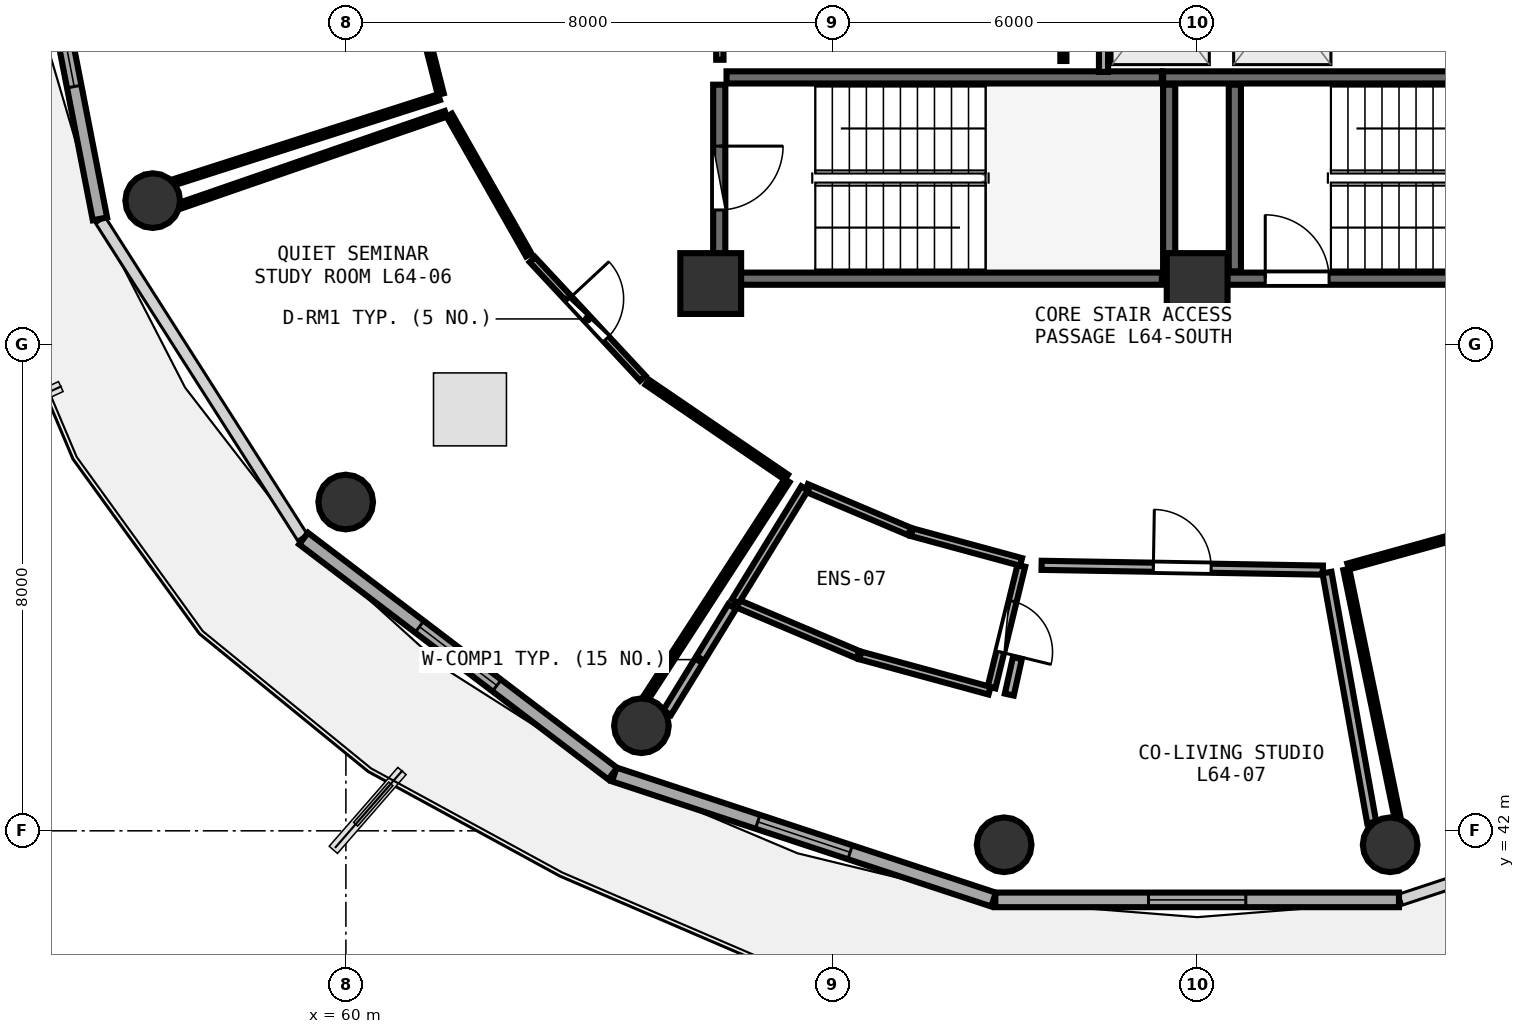
"""IFC4 building model, lengths in metres.
Left out: names, types, materials, properties, quantities, classifications, styles, units other than length and angle.
Written with IfcOpenShell. Run it as: python <this file> out.ifc"""

import sys

from ifc_helpers import new_model, si_unit, direction, frame, frame_2d, origin, origin_2d, place, context, subcontext, project, spatial, rectangle, circle, extrude, element, fill, save


model = new_model("IFC4")
c1 = context("Model", 3, precision=1e-05, world=origin(), true_north=direction((0.0, 1.0)))
c2 = subcontext(c1, "Body", "Model", "MODEL_VIEW")
j1 = project(units=[si_unit("LENGTHUNIT", "METRE"), si_unit("PLANEANGLEUNIT", "RADIAN")], contexts=[c1])
p1 = place(None, origin())
s1 = spatial("IfcSite", under=j1, at=p1, CompositionType="ELEMENT")
p2 = place(p1, origin())
s2 = spatial("IfcBuilding", under=s1, at=p2, CompositionType="ELEMENT")
p3 = place(p2, frame((0.0, 0.0, 252.45)))
s3 = spatial("IfcBuildingStorey", under=s2, at=p3, CompositionType="ELEMENT", Elevation=252.45)
for number, where, z_axis, x_axis in (
    (1, (66.0, 51.0, 0.0), (0.0, 0.0, 1.0), (1.0, 0.0, 0.0)),
    (2, (74.0, 51.0, 0.0), (0.0, 0.0, 1.0), (1.0, 0.0, 0.0)),
):
    element("IfcColumn", number, at=place(p3, frame(where, z_axis=z_axis, x_axis=x_axis)), inside=s3, PredefinedType="PILASTER", context=c2, shape_type="SweptSolid", body=[
        extrude(rectangle(XDim=1.0, YDim=1.0, at=origin_2d()), origin(), (0.0, 0.0, 1.0), 3.75),
    ])
for number, where, z_axis, x_axis in (
    (3, (56.823, 52.364, 0.0), (0.0, 0.0, 1.0), (1.0, 0.0, 0.0)),
    (4, (59.997, 47.407, 0.0), (0.0, 0.0, 1.0), (1.0, 0.0, 0.0)),
    (5, (64.86, 43.728, 0.0), (0.0, 0.0, 1.0), (1.0, 0.0, 0.0)),
    (6, (70.826, 41.771, 0.0), (0.0, 0.0, 1.0), (1.0, 0.0, 0.0)),
    (7, (77.174, 41.771, 0.0), (0.0, 0.0, 1.0), (1.0, 0.0, 0.0)),
):
    element("IfcColumn", number, at=place(p3, frame(where, z_axis=z_axis, x_axis=x_axis)), inside=s3, PredefinedType="COLUMN", context=c2, shape_type="SweptSolid", body=[
        extrude(circle(Radius=0.45, at=origin_2d()), origin(), (0.0, 0.0, 1.0), 3.75),
    ])
p4 = place(p3, frame((54.803, 57.985, 0.0), z_axis=(0.0, 0.0, 1.0), x_axis=(0.190969309115, -0.981596008028, 0.0)))
e8 = element("IfcWall", 8, at=p4, inside=s3, PredefinedType="SOLIDWALL", context=c2, shape_type="SweptSolid", body=[
    extrude(rectangle(XDim=6.033, YDim=0.24, at=frame_2d((3.017, 0.0))), origin(), (0.0, 0.0, 1.0), 3.475),
])
p5 = place(p4, frame((2.216, 0.0, 0.85)))
e9 = element("IfcOpeningElement", 9, at=p5, cuts=e8, PredefinedType="OPENING", context=c2, shape_type="SweptSolid", body=[
    extrude(rectangle(XDim=1.6, YDim=1.45, at=frame_2d((0.8, 0.725))), frame((0.0, 0.13, 0.0), z_axis=(0.0, -1.0, 0.0), x_axis=(1.0, 0.0, 0.0)), (0.0, 0.0, 1.0), 0.26),
])
p6 = place(p3, frame((59.304, 46.806, 0.0), z_axis=(0.0, 0.0, 1.0), x_axis=(0.796010444211, -0.605282886514, 0.0)))
e10 = element("IfcWall", 10, at=p6, inside=s3, PredefinedType="SOLIDWALL", context=c2, shape_type="SweptSolid", body=[
    extrude(rectangle(XDim=6.387, YDim=0.24, at=frame_2d((3.194, 0.0))), origin(), (0.0, 0.0, 1.0), 3.475),
])
p7 = place(p6, frame((2.394, 0.0, 0.85)))
e11 = element("IfcOpeningElement", 11, at=p7, cuts=e10, PredefinedType="OPENING", context=c2, shape_type="SweptSolid", body=[
    extrude(rectangle(XDim=1.6, YDim=1.45, at=frame_2d((0.8, 0.725))), frame((0.0, 0.13, 0.0), z_axis=(0.0, -1.0, 0.0), x_axis=(1.0, 0.0, 0.0)), (0.0, 0.0, 1.0), 0.26),
])
p8 = place(p3, frame((64.414, 42.927, 0.0), z_axis=(0.0, 0.0, 1.0), x_axis=(0.949663708393, -0.313271193954, 0.0)))
e12 = element("IfcWall", 12, at=p8, inside=s3, PredefinedType="SOLIDWALL", context=c2, shape_type="SweptSolid", body=[
    extrude(rectangle(XDim=6.568, YDim=0.24, at=frame_2d((3.284, 0.0))), origin(), (0.0, 0.0, 1.0), 3.475),
])
p9 = place(p8, frame((2.484, 0.0, 0.85)))
e13 = element("IfcOpeningElement", 13, at=p9, cuts=e12, PredefinedType="OPENING", context=c2, shape_type="SweptSolid", body=[
    extrude(rectangle(XDim=1.6, YDim=1.45, at=frame_2d((0.8, 0.725))), frame((0.0, 0.13, 0.0), z_axis=(0.0, -1.0, 0.0), x_axis=(1.0, 0.0, 0.0)), (0.0, 0.0, 1.0), 0.26),
])
p10 = place(p3, frame((70.681, 40.864, 0.0), z_axis=(0.0, 0.0, 1.0), x_axis=(1.0, 0.0, 0.0)))
e14 = element("IfcWall", 14, at=p10, inside=s3, PredefinedType="SOLIDWALL", context=c2, shape_type="SweptSolid", body=[
    extrude(rectangle(XDim=6.638, YDim=0.24, at=frame_2d((3.319, 0.0))), origin(), (0.0, 0.0, 1.0), 3.475),
])
p11 = place(p10, frame((2.519, 0.0, 0.85)))
e15 = element("IfcOpeningElement", 15, at=p11, cuts=e14, PredefinedType="OPENING", context=c2, shape_type="SweptSolid", body=[
    extrude(rectangle(XDim=1.6, YDim=1.45, at=frame_2d((0.8, 0.725))), frame((0.0, 0.13, 0.0), z_axis=(0.0, -1.0, 0.0), x_axis=(1.0, 0.0, 0.0)), (0.0, 0.0, 1.0), 0.26),
])
p12 = place(p3, frame((74.0, 51.08, 0.0), z_axis=(0.0, 0.0, 1.0), x_axis=(1.0, 0.0, 0.0)))
e16 = element("IfcWall", 16, at=p12, inside=s3, PredefinedType="SHEAR", context=c2, shape_type="SweptSolid", body=[
    extrude(rectangle(XDim=7.9, YDim=0.2, at=frame_2d((3.95, 0.0))), origin(), (0.0, 0.0, 1.0), 3.49),
])
p13 = place(p12, frame((1.12, 0.0, 0.0)))
e17 = element("IfcOpeningElement", 17, at=p13, cuts=e16, PredefinedType="OPENING", context=c2, shape_type="SweptSolid", body=[
    extrude(rectangle(XDim=1.05, YDim=2.1, at=frame_2d((0.525, 1.05))), frame((0.0, 0.11, 0.0), z_axis=(0.0, -1.0, 0.0), x_axis=(1.0, 0.0, 0.0)), (0.0, 0.0, 1.0), 0.22),
])
p14 = place(p3, frame((81.9, 54.39, 0.0), z_axis=(0.0, 0.0, 1.0), x_axis=(-1.0, 0.0, 0.0)))
e18 = element("IfcWall", 18, at=p14, inside=s3, PredefinedType="SHEAR", context=c2, shape_type="SweptSolid", body=[
    extrude(rectangle(XDim=8.46, YDim=0.2, at=frame_2d((4.23, 0.0))), origin(), (0.0, 0.0, 1.0), 3.49),
])
p15 = place(p3, frame((74.62, 54.27, 0.0), z_axis=(0.0, 0.0, 1.0), x_axis=(0.0, -1.0, 0.0)))
e19 = element("IfcWall", 19, at=p15, inside=s3, PredefinedType="SHEAR", context=c2, shape_type="SweptSolid", body=[
    extrude(rectangle(XDim=3.07, YDim=0.2, at=frame_2d((1.535, 0.0))), origin(), (0.0, 0.0, 1.0), 3.49),
])
p16 = place(p3, frame((66.26, 51.08, 0.0), z_axis=(0.0, 0.0, 1.0), x_axis=(1.0, 0.0, 0.0)))
e20 = element("IfcWall", 20, at=p16, inside=s3, PredefinedType="SHEAR", context=c2, shape_type="SweptSolid", body=[
    extrude(rectangle(XDim=7.16, YDim=0.2, at=frame_2d((3.58, 0.0))), origin(), (0.0, 0.0, 1.0), 3.49),
])
p17 = place(p3, frame((73.54, 51.2, 0.0), z_axis=(0.0, 0.0, 1.0), x_axis=(0.0, 1.0, 0.0)))
e21 = element("IfcWall", 21, at=p17, inside=s3, PredefinedType="SHEAR", context=c2, shape_type="SweptSolid", body=[
    extrude(rectangle(XDim=3.07, YDim=0.2, at=frame_2d((1.535, 0.0))), origin(), (0.0, 0.0, 1.0), 3.49),
])
p18 = place(p3, frame((73.42, 54.39, 0.0), z_axis=(0.0, 0.0, 1.0), x_axis=(-1.0, 0.0, 0.0)))
e22 = element("IfcWall", 22, at=p18, inside=s3, PredefinedType="SHEAR", context=c2, shape_type="SweptSolid", body=[
    extrude(rectangle(XDim=7.16, YDim=0.2, at=frame_2d((3.58, 0.0))), origin(), (0.0, 0.0, 1.0), 3.49),
])
p19 = place(p3, frame((66.14, 54.27, 0.0), z_axis=(0.0, 0.0, 1.0), x_axis=(0.0, -1.0, 0.0)))
e23 = element("IfcWall", 23, at=p19, inside=s3, PredefinedType="SHEAR", context=c2, shape_type="SweptSolid", body=[
    extrude(rectangle(XDim=3.07, YDim=0.2, at=frame_2d((1.535, 0.0))), origin(), (0.0, 0.0, 1.0), 3.49),
])
p20 = place(p19, frame((1.01, 0.0, 0.0)))
e24 = element("IfcOpeningElement", 24, at=p20, cuts=e23, PredefinedType="OPENING", context=c2, shape_type="SweptSolid", body=[
    extrude(rectangle(XDim=1.05, YDim=2.1, at=frame_2d((0.525, 1.05))), frame((0.0, 0.11, 0.0), z_axis=(0.0, -1.0, 0.0), x_axis=(1.0, 0.0, 0.0)), (0.0, 0.0, 1.0), 0.22),
])
p21 = place(p3, frame((72.46, 54.48, 0.0), z_axis=(0.0, 0.0, 1.0), x_axis=(0.0, 1.0, 0.0)))
e25 = element("IfcWall", 25, at=p21, inside=s3, PredefinedType="PARTITIONING", context=c2, shape_type="SweptSolid", body=[
    extrude(rectangle(XDim=2.29, YDim=0.15, at=frame_2d((1.145, 0.0))), origin(), (0.0, 0.0, 1.0), 3.48),
])
p22 = place(p3, frame((66.15, 54.68, 0.0), z_axis=(0.0, 0.0, 1.0), x_axis=(0.0, 1.0, 0.0)))
e26 = element("IfcWall", 26, at=p22, inside=s3, PredefinedType="PARTITIONING", context=c2, shape_type="SweptSolid", body=[
    extrude(rectangle(XDim=2.11, YDim=0.12, at=frame_2d((1.055, 0.0))), origin(), (0.0, 0.0, 1.0), 2.775),
])
p23 = place(p22, frame((0.605, 0.0, 0.0)))
e27 = element("IfcOpeningElement", 27, at=p23, cuts=e26, PredefinedType="OPENING", context=c2, shape_type="SweptSolid", body=[
    extrude(rectangle(XDim=0.9, YDim=2.08, at=frame_2d((0.45, 1.04))), frame((0.0, 0.07, 0.0), z_axis=(0.0, -1.0, 0.0), x_axis=(1.0, 0.0, 0.0)), (0.0, 0.0, 1.0), 0.14),
])
p24 = place(p3, frame((63.067, 51.393, 0.0), z_axis=(0.0, 0.0, 1.0), x_axis=(0.681315269885, -0.731990097625, 0.0)))
e28 = element("IfcWall", 28, at=p24, inside=s3, PredefinedType="PARTITIONING", context=c2, shape_type="SweptSolid", body=[
    extrude(rectangle(XDim=2.664, YDim=0.12, at=frame_2d((1.332, 0.0))), origin(), (0.0, 0.0, 1.0), 3.075),
])
p25 = place(p24, frame((0.882, 0.0, 0.0)))
e29 = element("IfcOpeningElement", 29, at=p25, cuts=e28, PredefinedType="OPENING", context=c2, shape_type="SweptSolid", body=[
    extrude(rectangle(XDim=0.9, YDim=2.08, at=frame_2d((0.45, 1.04))), frame((0.0, 0.07, 0.0), z_axis=(0.0, -1.0, 0.0), x_axis=(1.0, 0.0, 0.0)), (0.0, 0.0, 1.0), 0.14),
])
p26 = place(p3, frame((71.109, 46.359, 0.0), z_axis=(0.0, 0.0, 1.0), x_axis=(-0.237485395018, -0.971391109262, 0.0)))
e30 = element("IfcWall", 30, at=p26, inside=s3, PredefinedType="PLUMBINGWALL", context=c2, shape_type="SweptSolid", body=[
    extrude(rectangle(XDim=2.06, YDim=0.13, at=frame_2d((1.03, 0.0))), origin(), (0.0, 0.0, 1.0), 3.175),
])
p27 = place(p26, frame((0.6, 0.0, 0.0)))
e31 = element("IfcOpeningElement", 31, at=p27, cuts=e30, PredefinedType="OPENING", context=c2, shape_type="SweptSolid", body=[
    extrude(rectangle(XDim=0.86, YDim=2.05, at=frame_2d((0.43, 1.025))), frame((0.0, 0.075, 0.0), z_axis=(0.0, -1.0, 0.0), x_axis=(1.0, 0.0, 0.0)), (0.0, 0.0, 1.0), 0.15),
])
p28 = place(p3, frame((71.442, 46.366, 0.0), z_axis=(0.0, 0.0, 1.0), x_axis=(0.99985475278, -0.017043278545, 0.0)))
e32 = element("IfcWall", 32, at=p28, inside=s3, PredefinedType="PARTITIONING", context=c2, shape_type="SweptSolid", body=[
    extrude(rectangle(XDim=4.627, YDim=0.15, at=frame_2d((2.313, 0.0))), origin(), (0.0, 0.0, 1.0), 3.075),
])
p29 = place(p28, frame((1.838, 0.0, 0.0)))
e33 = element("IfcOpeningElement", 33, at=p29, cuts=e32, PredefinedType="OPENING", context=c2, shape_type="SweptSolid", body=[
    extrude(rectangle(XDim=0.95, YDim=2.08, at=frame_2d((0.475, 1.04))), frame((0.0, 0.085, 0.0), z_axis=(0.0, -1.0, 0.0), x_axis=(1.0, 0.0, 0.0)), (0.0, 0.0, 1.0), 0.17),
])
p30 = place(p3, frame((71.8, 54.66, 0.0), z_axis=(0.0, 0.0, 1.0), x_axis=(0.0, 1.0, 0.0)))
e34 = element("IfcWall", 34, at=p30, inside=s3, PredefinedType="PARTITIONING", context=c2, shape_type="SweptSolid", body=[
    extrude(rectangle(XDim=2.15, YDim=0.1, at=frame_2d((1.075, 0.0))), origin(), (0.0, 0.0, 1.0), 3.48),
])
p31 = place(p3, frame((60.923, 56.631, 0.0), z_axis=(0.0, 0.0, 1.0), x_axis=(0.245655775867, -0.969357127061, 0.0)))
e35 = element("IfcWall", 35, at=p31, inside=s3, PredefinedType="PARTITIONING", context=c2, shape_type="SweptSolid", body=[
    extrude(rectangle(XDim=2.595, YDim=0.1, at=frame_2d((1.297, 0.0))), origin(), (0.0, 0.0, 1.0), 3.48),
])
p32 = place(p3, frame((61.532, 54.065, 0.0), z_axis=(0.0, 0.0, 1.0), x_axis=(-0.95227750557, -0.305233602976, 0.0)))
e36 = element("IfcWall", 36, at=p32, inside=s3, PredefinedType="PARTITIONING", context=c2, shape_type="SweptSolid", body=[
    extrude(rectangle(XDim=4.565, YDim=0.1, at=frame_2d((2.283, 0.0))), origin(), (0.0, 0.0, 1.0), 3.175),
])
p33 = place(p3, frame((61.7, 53.769, 0.0), z_axis=(0.0, 0.0, 1.0), x_axis=(0.494277588427, -0.869304127207, 0.0)))
e37 = element("IfcWall", 37, at=p33, inside=s3, PredefinedType="PARTITIONING", context=c2, shape_type="SweptSolid", body=[
    extrude(rectangle(XDim=2.643, YDim=0.1, at=frame_2d((1.322, 0.0))), origin(), (0.0, 0.0, 1.0), 3.075),
])
p34 = place(p3, frame((64.956, 49.376, 0.0), z_axis=(0.0, 0.0, 1.0), x_axis=(0.826087380575, -0.563542047814, 0.0)))
e38 = element("IfcWall", 38, at=p34, inside=s3, PredefinedType="PARTITIONING", context=c2, shape_type="SweptSolid", body=[
    extrude(rectangle(XDim=2.768, YDim=0.1, at=frame_2d((1.384, 0.0))), origin(), (0.0, 0.0, 1.0), 3.075),
])
p35 = place(p3, frame((67.254, 47.76, 0.0), z_axis=(0.0, 0.0, 1.0), x_axis=(-0.544234825024, -0.838932926539, 0.0)))
e39 = element("IfcWall", 39, at=p35, inside=s3, PredefinedType="PARTITIONING", context=c2, shape_type="SweptSolid", body=[
    extrude(rectangle(XDim=4.249, YDim=0.1, at=frame_2d((2.125, 0.0))), origin(), (0.0, 0.0, 1.0), 3.075),
])
p36 = place(p3, frame((57.291, 52.287, 0.0), z_axis=(0.0, 0.0, 1.0), x_axis=(0.945103281494, 0.326771766388, 0.0)))
e40 = element("IfcWall", 40, at=p36, inside=s3, PredefinedType="PARTITIONING", context=c2, shape_type="SweptSolid", body=[
    extrude(rectangle(XDim=4.604, YDim=0.1, at=frame_2d((2.302, 0.0))), origin(), (0.0, 0.0, 1.0), 3.075),
])
p37 = place(p3, frame((67.573, 47.641, 0.0), z_axis=(0.0, 0.0, 1.0), x_axis=(0.920910556575, -0.389773968845, 0.0)))
e41 = element("IfcWall", 41, at=p37, inside=s3, PredefinedType="PLUMBINGWALL", context=c2, shape_type="SweptSolid", body=[
    extrude(rectangle(XDim=1.843, YDim=0.13, at=frame_2d((0.921, 0.0))), origin(), (0.0, 0.0, 1.0), 3.48),
])
p38 = place(p3, frame((69.308, 46.91, 0.0), z_axis=(0.0, 0.0, 1.0), x_axis=(0.96501774213, -0.262184586453, 0.0)))
e42 = element("IfcWall", 42, at=p38, inside=s3, PredefinedType="PLUMBINGWALL", context=c2, shape_type="SweptSolid", body=[
    extrude(rectangle(XDim=1.861, YDim=0.13, at=frame_2d((0.93, 0.0))), origin(), (0.0, 0.0, 1.0), 3.48),
])
p39 = place(p3, frame((70.586, 44.304, 0.0), z_axis=(0.0, 0.0, 1.0), x_axis=(-0.96480470919, 0.262967437384, 0.0)))
e43 = element("IfcWall", 43, at=p39, inside=s3, PredefinedType="PLUMBINGWALL", context=c2, shape_type="SweptSolid", body=[
    extrude(rectangle(XDim=2.204, YDim=0.13, at=frame_2d((1.102, 0.0))), origin(), (0.0, 0.0, 1.0), 3.48),
])
p40 = place(p3, frame((68.422, 44.897, 0.0), z_axis=(0.0, 0.0, 1.0), x_axis=(-0.920791207069, 0.390055833162, 0.0)))
e44 = element("IfcWall", 44, at=p40, inside=s3, PredefinedType="PLUMBINGWALL", context=c2, shape_type="SweptSolid", body=[
    extrude(rectangle(XDim=2.183, YDim=0.13, at=frame_2d((1.092, 0.0))), origin(), (0.0, 0.0, 1.0), 3.48),
])
p41 = place(p3, frame((66.404, 45.773, 0.0), z_axis=(0.0, 0.0, 1.0), x_axis=(0.523029155304, 0.85231479085, 0.0)))
e45 = element("IfcWall", 45, at=p41, inside=s3, PredefinedType="PLUMBINGWALL", context=c2, shape_type="SweptSolid", body=[
    extrude(rectangle(XDim=2.181, YDim=0.13, at=frame_2d((1.091, 0.0))), origin(), (0.0, 0.0, 1.0), 3.175),
])
p42 = place(p3, frame((76.135, 46.247, 0.0), z_axis=(0.0, 0.0, 1.0), x_axis=(0.176199339585, -0.984354505618, 0.0)))
e46 = element("IfcWall", 46, at=p42, inside=s3, PredefinedType="PARTITIONING", context=c2, shape_type="SweptSolid", body=[
    extrude(rectangle(XDim=4.176, YDim=0.15, at=frame_2d((2.088, 0.0))), origin(), (0.0, 0.0, 1.0), 3.075),
])
p43 = place(p3, frame((65.283, 43.944, 0.0), z_axis=(0.0, 0.0, 1.0), x_axis=(0.522864415557, 0.852415862677, 0.0)))
e47 = element("IfcWall", 47, at=p43, inside=s3, PredefinedType="PARTITIONING", context=c2, shape_type="SweptSolid", body=[
    extrude(rectangle(XDim=2.045, YDim=0.15, at=frame_2d((1.022, 0.0))), origin(), (0.0, 0.0, 1.0), 3.235),
])
p44 = place(p3, frame((70.911, 44.24, 0.0), z_axis=(0.0, 0.0, 1.0), x_axis=(0.216216290924, 0.976345489844, 0.0)))
e48 = element("IfcWall", 48, at=p44, inside=s3, PredefinedType="PARTITIONING", context=c2, shape_type="SweptSolid", body=[
    extrude(rectangle(XDim=0.615, YDim=0.15, at=frame_2d((0.308, 0.0))), origin(), (0.0, 0.0, 1.0), 3.48),
])
p45 = place(p3, frame((76.483, 46.347, 0.0), z_axis=(0.0, 0.0, 1.0), x_axis=(0.963478601256, 0.267785333659, 0.0)))
e49 = element("IfcWall", 49, at=p45, inside=s3, PredefinedType="PARTITIONING", context=c2, shape_type="SweptSolid", body=[
    extrude(rectangle(XDim=2.848, YDim=0.1, at=frame_2d((1.424, 0.0))), origin(), (0.0, 0.0, 1.0), 3.48),
])
p46 = place(p3, frame((77.293, 42.23, 0.0), z_axis=(0.0, 0.0, 1.0), x_axis=(-0.202308141573, 0.979321916355, 0.0)))
e50 = element("IfcWall", 50, at=p46, inside=s3, PredefinedType="PARTITIONING", context=c2, shape_type="SweptSolid", body=[
    extrude(rectangle(XDim=4.153, YDim=0.1, at=frame_2d((2.076, 0.0))), origin(), (0.0, 0.0, 1.0), 3.175),
])
p47 = place(p5, origin())
e51 = element("IfcWindow", 51, at=p47, inside=s3, PartitioningType="SINGLE_PANEL", PredefinedType="WINDOW", context=c2, shape_type="SweptSolid", body=[
    extrude(rectangle(XDim=1.6, YDim=1.45, at=frame_2d((0.8, 0.725))), frame((0.0, 0.03, 0.0), z_axis=(0.0, -1.0, 0.0), x_axis=(1.0, 0.0, 0.0)), (0.0, 0.0, 1.0), 0.06),
])
fill(e9, e51)
p48 = place(p7, origin())
e52 = element("IfcWindow", 52, at=p48, inside=s3, PartitioningType="SINGLE_PANEL", PredefinedType="WINDOW", context=c2, shape_type="SweptSolid", body=[
    extrude(rectangle(XDim=1.6, YDim=1.45, at=frame_2d((0.8, 0.725))), frame((0.0, 0.03, 0.0), z_axis=(0.0, -1.0, 0.0), x_axis=(1.0, 0.0, 0.0)), (0.0, 0.0, 1.0), 0.06),
])
fill(e11, e52)
p49 = place(p9, origin())
e53 = element("IfcWindow", 53, at=p49, inside=s3, PartitioningType="SINGLE_PANEL", PredefinedType="WINDOW", context=c2, shape_type="SweptSolid", body=[
    extrude(rectangle(XDim=1.6, YDim=1.45, at=frame_2d((0.8, 0.725))), frame((0.0, 0.03, 0.0), z_axis=(0.0, -1.0, 0.0), x_axis=(1.0, 0.0, 0.0)), (0.0, 0.0, 1.0), 0.06),
])
fill(e13, e53)
p50 = place(p11, origin())
e54 = element("IfcWindow", 54, at=p50, inside=s3, PartitioningType="SINGLE_PANEL", PredefinedType="WINDOW", context=c2, shape_type="SweptSolid", body=[
    extrude(rectangle(XDim=1.6, YDim=1.45, at=frame_2d((0.8, 0.725))), frame((0.0, 0.03, 0.0), z_axis=(0.0, -1.0, 0.0), x_axis=(1.0, 0.0, 0.0)), (0.0, 0.0, 1.0), 0.06),
])
fill(e15, e54)
p51 = place(p13, origin())
e55 = element("IfcDoor", 55, at=p51, inside=s3, OperationType="SINGLE_SWING_LEFT", PredefinedType="DOOR", context=c2, shape_type="SweptSolid", body=[
    extrude(rectangle(XDim=1.05, YDim=2.1, at=frame_2d((0.525, 1.05))), frame((0.0, 0.025, 0.0), z_axis=(0.0, -1.0, 0.0), x_axis=(1.0, 0.0, 0.0)), (0.0, 0.0, 1.0), 0.05),
])
fill(e17, e55)
p52 = place(p20, origin())
e56 = element("IfcDoor", 56, at=p52, inside=s3, OperationType="SINGLE_SWING_LEFT", PredefinedType="DOOR", context=c2, shape_type="SweptSolid", body=[
    extrude(rectangle(XDim=1.05, YDim=2.1, at=frame_2d((0.525, 1.05))), frame((0.0, 0.025, 0.0), z_axis=(0.0, -1.0, 0.0), x_axis=(1.0, 0.0, 0.0)), (0.0, 0.0, 1.0), 0.05),
])
fill(e24, e56)
p53 = place(p25, origin())
e57 = element("IfcDoor", 57, at=p53, inside=s3, OperationType="SINGLE_SWING_LEFT", PredefinedType="DOOR", context=c2, shape_type="SweptSolid", body=[
    extrude(rectangle(XDim=0.9, YDim=2.08, at=frame_2d((0.45, 1.04))), frame((0.0, 0.025, 0.0), z_axis=(0.0, -1.0, 0.0), x_axis=(1.0, 0.0, 0.0)), (0.0, 0.0, 1.0), 0.05),
])
fill(e29, e57)
p54 = place(p27, origin())
e58 = element("IfcDoor", 58, at=p54, inside=s3, OperationType="SINGLE_SWING_RIGHT", PredefinedType="DOOR", context=c2, shape_type="SweptSolid", body=[
    extrude(rectangle(XDim=0.86, YDim=2.05, at=frame_2d((0.43, 1.025))), frame((0.0, 0.025, 0.0), z_axis=(0.0, -1.0, 0.0), x_axis=(1.0, 0.0, 0.0)), (0.0, 0.0, 1.0), 0.05),
])
fill(e31, e58)
p55 = place(p29, origin())
e59 = element("IfcDoor", 59, at=p55, inside=s3, OperationType="SINGLE_SWING_LEFT", PredefinedType="DOOR", context=c2, shape_type="SweptSolid", body=[
    extrude(rectangle(XDim=0.95, YDim=2.08, at=frame_2d((0.475, 1.04))), frame((0.0, 0.025, 0.0), z_axis=(0.0, -1.0, 0.0), x_axis=(1.0, 0.0, 0.0)), (0.0, 0.0, 1.0), 0.05),
])
fill(e33, e59)
save(model, sys.argv[1])
